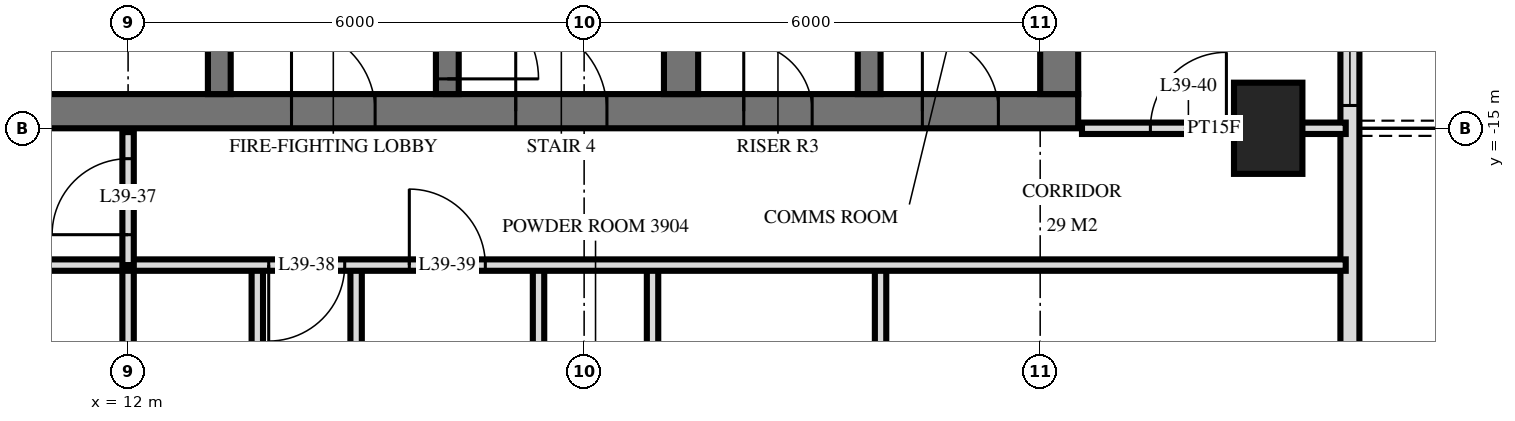
"""IFC4 building model, lengths in metres.
Left out: names, types, materials, properties, quantities, classifications, styles, units other than length and angle.
Written with IfcOpenShell. Run it as: python <this file> out.ifc"""

import sys

from ifc_helpers import new_model, si_unit, direction, frame, frame_2d, origin, origin_2d, place, context, subcontext, project, spatial, rectangle, extrude, element, fill, save


model = new_model("IFC4")
c1 = context("Model", 3, precision=1e-05, world=origin(), true_north=direction((0.0, 1.0)))
c2 = subcontext(c1, "Body", "Model", "MODEL_VIEW")
j1 = project(units=[si_unit("LENGTHUNIT", "METRE"), si_unit("PLANEANGLEUNIT", "RADIAN")], contexts=[c1])
p1 = place(None, origin())
s1 = spatial("IfcSite", under=j1, at=p1, CompositionType="ELEMENT")
p2 = place(p1, origin())
s2 = spatial("IfcBuilding", under=s1, at=p2, CompositionType="ELEMENT")
p3 = place(p2, frame((0.0, 0.0, 152.4)))
s3 = spatial("IfcBuildingStorey", under=s2, at=p3, CompositionType="ELEMENT", Elevation=152.4)
p4 = place(p3, frame((27.0, -15.0, 0.0), z_axis=(0.0, 0.0, 1.0), x_axis=(0.0, 1.0, 0.0)))
e1 = element("IfcColumn", 1, at=p4, inside=s3, PredefinedType="COLUMN", context=c2, shape_type="SweptSolid", body=[
    extrude(rectangle(XDim=1.2, YDim=0.9, at=origin_2d()), origin(), (0.0, 0.0, 1.0), 3.6),
])
p5 = place(p3, frame((10.0, -14.775, 0.0), z_axis=(0.0, 0.0, 1.0), x_axis=(1.0, 0.0, 0.0)))
e2 = element("IfcWall", 2, at=p5, inside=s3, PredefinedType="SHEAR", context=c2, shape_type="SweptSolid", body=[
    extrude(rectangle(XDim=14.5, YDim=0.45, at=frame_2d((7.25, 0.0))), origin(), (0.0, 0.0, 1.0), 3.6),
])
p6 = place(p5, frame((7.1, 0.0, 0.0)))
e3 = element("IfcOpeningElement", 3, at=p6, cuts=e2, PredefinedType="OPENING", context=c2, shape_type="SweptSolid", body=[
    extrude(rectangle(XDim=1.2, YDim=2.1, at=frame_2d((0.6, 1.05))), frame((0.0, 0.235, 0.0), z_axis=(0.0, -1.0, 0.0), x_axis=(1.0, 0.0, 0.0)), (0.0, 0.0, 1.0), 0.47),
])
p7 = place(p5, frame((4.15, 0.0, 0.0)))
e4 = element("IfcOpeningElement", 4, at=p7, cuts=e2, PredefinedType="OPENING", context=c2, shape_type="SweptSolid", body=[
    extrude(rectangle(XDim=1.1, YDim=2.1, at=frame_2d((0.55, 1.05))), frame((0.0, 0.235, 0.0), z_axis=(0.0, -1.0, 0.0), x_axis=(1.0, 0.0, 0.0)), (0.0, 0.0, 1.0), 0.47),
])
p8 = place(p5, frame((10.1, 0.0, 0.0)))
e5 = element("IfcOpeningElement", 5, at=p8, cuts=e2, PredefinedType="OPENING", context=c2, shape_type="SweptSolid", body=[
    extrude(rectangle(XDim=0.9, YDim=2.1, at=frame_2d((0.45, 1.05))), frame((0.0, 0.235, 0.0), z_axis=(0.0, -1.0, 0.0), x_axis=(1.0, 0.0, 0.0)), (0.0, 0.0, 1.0), 0.47),
])
p9 = place(p5, frame((12.45, 0.0, 0.0)))
e6 = element("IfcOpeningElement", 6, at=p9, cuts=e2, PredefinedType="OPENING", context=c2, shape_type="SweptSolid", body=[
    extrude(rectangle(XDim=1.0, YDim=2.1, at=frame_2d((0.5, 1.05))), frame((0.0, 0.235, 0.0), z_axis=(0.0, -1.0, 0.0), x_axis=(1.0, 0.0, 0.0)), (0.0, 0.0, 1.0), 0.47),
])
p10 = place(p3, frame((24.25, -14.55, 0.0), z_axis=(0.0, 0.0, 1.0), x_axis=(0.0, 1.0, 0.0)))
e7 = element("IfcWall", 7, at=p10, inside=s3, PredefinedType="SHEAR", context=c2, shape_type="SweptSolid", body=[
    extrude(rectangle(XDim=14.1, YDim=0.5, at=frame_2d((7.05, 0.0))), origin(), (0.0, 0.0, 1.0), 3.6),
])
p11 = place(p3, frame((13.2, -14.55, 0.0), z_axis=(0.0, 0.0, 1.0), x_axis=(0.0, 1.0, 0.0)))
e8 = element("IfcWall", 8, at=p11, inside=s3, PredefinedType="SHEAR", context=c2, shape_type="SweptSolid", body=[
    extrude(rectangle(XDim=5.4, YDim=0.3, at=frame_2d((2.7, 0.0))), origin(), (0.0, 0.0, 1.0), 3.6),
])
p12 = place(p11, frame((4.0, 0.0, 0.0)))
e9 = element("IfcOpeningElement", 9, at=p12, cuts=e8, PredefinedType="OPENING", context=c2, shape_type="SweptSolid", body=[
    extrude(rectangle(XDim=1.2, YDim=2.1, at=frame_2d((0.6, 1.05))), frame((0.0, 0.16, 0.0), z_axis=(0.0, -1.0, 0.0), x_axis=(1.0, 0.0, 0.0)), (0.0, 0.0, 1.0), 0.32),
])
p13 = place(p3, frame((16.2, -14.55, 0.0), z_axis=(0.0, 0.0, 1.0), x_axis=(0.0, 1.0, 0.0)))
e10 = element("IfcWall", 10, at=p13, inside=s3, PredefinedType="SHEAR", context=c2, shape_type="SweptSolid", body=[
    extrude(rectangle(XDim=5.4, YDim=0.3, at=frame_2d((2.7, 0.0))), origin(), (0.0, 0.0, 1.0), 3.6),
])
p14 = place(p13, frame((0.2, 0.0, 0.0)))
e11 = element("IfcOpeningElement", 11, at=p14, cuts=e10, PredefinedType="OPENING", context=c2, shape_type="SweptSolid", body=[
    extrude(rectangle(XDim=1.2, YDim=2.1, at=frame_2d((0.6, 1.05))), frame((0.0, 0.16, 0.0), z_axis=(0.0, -1.0, 0.0), x_axis=(1.0, 0.0, 0.0)), (0.0, 0.0, 1.0), 0.32),
])
p15 = place(p3, frame((19.275, -14.55, 0.0), z_axis=(0.0, 0.0, 1.0), x_axis=(0.0, 1.0, 0.0)))
e12 = element("IfcWall", 12, at=p15, inside=s3, PredefinedType="SHEAR", context=c2, shape_type="SweptSolid", body=[
    extrude(rectangle(XDim=5.4, YDim=0.45, at=frame_2d((2.7, 0.0))), origin(), (0.0, 0.0, 1.0), 3.6),
])
p16 = place(p3, frame((21.75, -14.55, 0.0), z_axis=(0.0, 0.0, 1.0), x_axis=(0.0, 1.0, 0.0)))
e13 = element("IfcWall", 13, at=p16, inside=s3, PredefinedType="SHEAR", context=c2, shape_type="SweptSolid", body=[
    extrude(rectangle(XDim=5.4, YDim=0.3, at=frame_2d((2.7, 0.0))), origin(), (0.0, 0.0, 1.0), 3.6),
])
p17 = place(p3, frame((28.075, -29.275, 0.0), z_axis=(0.0, 0.0, 1.0), x_axis=(0.0, 1.0, 0.0)))
e14 = element("IfcWall", 14, at=p17, inside=s3, PredefinedType="SOLIDWALL", context=c2, shape_type="SweptSolid", body=[
    extrude(rectangle(XDim=25.951, YDim=0.25, at=frame_2d((12.975, 0.0))), origin(), (0.0, 0.0, 1.0), 3.32),
])
p18 = place(p17, frame((0.575, 0.0, 0.0)))
e15 = element("IfcOpeningElement", 15, at=p18, cuts=e14, PredefinedType="OPENING", context=c2, shape_type="SweptSolid", body=[
    extrude(rectangle(XDim=1.8, YDim=2.4, at=frame_2d((0.9, 1.2))), frame((0.0, 0.135, 0.0), z_axis=(0.0, -1.0, 0.0), x_axis=(1.0, 0.0, 0.0)), (0.0, 0.0, 1.0), 0.27),
])
p19 = place(p17, frame((3.325, 0.0, 0.3)))
e16 = element("IfcOpeningElement", 16, at=p19, cuts=e14, PredefinedType="OPENING", context=c2, shape_type="SweptSolid", body=[
    extrude(rectangle(XDim=1.8, YDim=2.1, at=frame_2d((0.9, 1.05))), frame((0.0, 0.135, 0.0), z_axis=(0.0, -1.0, 0.0), x_axis=(1.0, 0.0, 0.0)), (0.0, 0.0, 1.0), 0.27),
])
p20 = place(p17, frame((9.475, 0.0, 0.0)))
e17 = element("IfcOpeningElement", 17, at=p20, cuts=e14, PredefinedType="OPENING", context=c2, shape_type="SweptSolid", body=[
    extrude(rectangle(XDim=1.8, YDim=2.4, at=frame_2d((0.9, 1.2))), frame((0.0, 0.135, 0.0), z_axis=(0.0, -1.0, 0.0), x_axis=(1.0, 0.0, 0.0)), (0.0, 0.0, 1.0), 0.27),
])
p21 = place(p17, frame((14.575, 0.0, 0.3)))
e18 = element("IfcOpeningElement", 18, at=p21, cuts=e14, PredefinedType="OPENING", context=c2, shape_type="SweptSolid", body=[
    extrude(rectangle(XDim=2.4, YDim=2.1, at=frame_2d((1.2, 1.05))), frame((0.0, 0.135, 0.0), z_axis=(0.0, -1.0, 0.0), x_axis=(1.0, 0.0, 0.0)), (0.0, 0.0, 1.0), 0.27),
])
p22 = place(p17, frame((17.875, 0.0, 0.0)))
e19 = element("IfcOpeningElement", 19, at=p22, cuts=e14, PredefinedType="OPENING", context=c2, shape_type="SweptSolid", body=[
    extrude(rectangle(XDim=1.8, YDim=2.4, at=frame_2d((0.9, 1.2))), frame((0.0, 0.135, 0.0), z_axis=(0.0, -1.0, 0.0), x_axis=(1.0, 0.0, 0.0)), (0.0, 0.0, 1.0), 0.27),
])
p23 = place(p3, frame((21.9, -21.0, 0.0), z_axis=(0.0, 0.0, 1.0), x_axis=(0.0, 1.0, 0.0)))
e20 = element("IfcWall", 20, at=p23, inside=s3, PredefinedType="PARTITIONING", context=c2, shape_type="SweptSolid", body=[
    extrude(rectangle(XDim=4.2, YDim=0.15, at=frame_2d((2.1, 0.0))), origin(), (0.0, 0.0, 1.0), 3.32),
])
p24 = place(p3, frame((18.9, -21.0, 0.0), z_axis=(0.0, 0.0, 1.0), x_axis=(0.0, 1.0, 0.0)))
e21 = element("IfcWall", 21, at=p24, inside=s3, PredefinedType="PLUMBINGWALL", context=c2, shape_type="SweptSolid", body=[
    extrude(rectangle(XDim=4.2, YDim=0.15, at=frame_2d((2.1, 0.0))), origin(), (0.0, 0.0, 1.0), 3.32),
])
p25 = place(p3, frame((17.4, -21.0, 0.0), z_axis=(0.0, 0.0, 1.0), x_axis=(0.0, 1.0, 0.0)))
e22 = element("IfcWall", 22, at=p25, inside=s3, PredefinedType="PARTITIONING", context=c2, shape_type="SweptSolid", body=[
    extrude(rectangle(XDim=4.2, YDim=0.15, at=frame_2d((2.1, 0.0))), origin(), (0.0, 0.0, 1.0), 3.32),
])
p26 = place(p25, frame((1.6, 0.0, 0.0)))
e23 = element("IfcOpeningElement", 23, at=p26, cuts=e22, PredefinedType="OPENING", context=c2, shape_type="SweptSolid", body=[
    extrude(rectangle(XDim=1.0, YDim=2.1, at=frame_2d((0.5, 1.05))), frame((0.0, 0.085, 0.0), z_axis=(0.0, -1.0, 0.0), x_axis=(1.0, 0.0, 0.0)), (0.0, 0.0, 1.0), 0.17),
])
p27 = place(p3, frame((15.0, -21.0, 0.0), z_axis=(0.0, 0.0, 1.0), x_axis=(0.0, 1.0, 0.0)))
e24 = element("IfcWall", 24, at=p27, inside=s3, PredefinedType="PARTITIONING", context=c2, shape_type="SweptSolid", body=[
    extrude(rectangle(XDim=4.2, YDim=0.15, at=frame_2d((2.1, 0.0))), origin(), (0.0, 0.0, 1.0), 3.32),
])
p28 = place(p3, frame((13.7, -21.8, 0.0), z_axis=(0.0, 0.0, 1.0), x_axis=(0.0, 1.0, 0.0)))
e25 = element("IfcWall", 25, at=p28, inside=s3, PredefinedType="PARTITIONING", context=c2, shape_type="SweptSolid", body=[
    extrude(rectangle(XDim=5.0, YDim=0.15, at=frame_2d((2.5, 0.0))), origin(), (0.0, 0.0, 1.0), 3.32),
])
p29 = place(p28, frame((2.1, 0.0, 0.0)))
e26 = element("IfcOpeningElement", 26, at=p29, cuts=e25, PredefinedType="OPENING", context=c2, shape_type="SweptSolid", body=[
    extrude(rectangle(XDim=0.8, YDim=2.1, at=frame_2d((0.4, 1.05))), frame((0.0, 0.085, 0.0), z_axis=(0.0, -1.0, 0.0), x_axis=(1.0, 0.0, 0.0)), (0.0, 0.0, 1.0), 0.17),
])
p30 = place(p3, frame((12.0, -16.8, 0.0), z_axis=(0.0, 0.0, 1.0), x_axis=(0.0, 1.0, 0.0)))
e27 = element("IfcWall", 27, at=p30, inside=s3, PredefinedType="PARTITIONING", context=c2, shape_type="SweptSolid", body=[
    extrude(rectangle(XDim=1.75, YDim=0.15, at=frame_2d((0.875, 0.0))), origin(), (0.0, 0.0, 1.0), 3.32),
])
p31 = place(p30, frame((0.4, 0.0, 0.0)))
e28 = element("IfcOpeningElement", 28, at=p31, cuts=e27, PredefinedType="OPENING", context=c2, shape_type="SweptSolid", body=[
    extrude(rectangle(XDim=1.0, YDim=2.1, at=frame_2d((0.5, 1.05))), frame((0.0, 0.085, 0.0), z_axis=(0.0, -1.0, 0.0), x_axis=(1.0, 0.0, 0.0)), (0.0, 0.0, 1.0), 0.17),
])
p32 = place(p3, frame((12.0, -33.62, 0.0), z_axis=(0.0, 0.0, 1.0), x_axis=(0.0, 1.0, 0.0)))
e29 = element("IfcWall", 29, at=p32, inside=s3, PredefinedType="PARTITIONING", context=c2, shape_type="SweptSolid", body=[
    extrude(rectangle(XDim=16.82, YDim=0.15, at=frame_2d((8.41, 0.0))), origin(), (0.0, 0.0, 1.0), 3.32),
])
p33 = place(p3, frame((-28.02, -16.8, 0.0), z_axis=(0.0, 0.0, 1.0), x_axis=(1.0, 0.0, 0.0)))
e30 = element("IfcWall", 30, at=p33, inside=s3, PredefinedType="PARTITIONING", context=c2, shape_type="SweptSolid", body=[
    extrude(rectangle(XDim=56.04, YDim=0.15, at=frame_2d((28.02, 0.0))), origin(), (0.0, 0.0, 1.0), 3.32),
])
p34 = place(p33, frame((13.17, 0.0, 0.0)))
e31 = element("IfcOpeningElement", 31, at=p34, cuts=e30, PredefinedType="OPENING", context=c2, shape_type="SweptSolid", body=[
    extrude(rectangle(XDim=1.0, YDim=2.1, at=frame_2d((0.5, 1.05))), frame((0.0, 0.085, 0.0), z_axis=(0.0, -1.0, 0.0), x_axis=(1.0, 0.0, 0.0)), (0.0, 0.0, 1.0), 0.17),
])
p35 = place(p33, frame((11.32, 0.0, 0.0)))
e32 = element("IfcOpeningElement", 32, at=p35, cuts=e30, PredefinedType="OPENING", context=c2, shape_type="SweptSolid", body=[
    extrude(rectangle(XDim=1.0, YDim=2.1, at=frame_2d((0.5, 1.05))), frame((0.0, 0.085, 0.0), z_axis=(0.0, -1.0, 0.0), x_axis=(1.0, 0.0, 0.0)), (0.0, 0.0, 1.0), 0.17),
])
p36 = place(p33, frame((41.87, 0.0, 0.0)))
e33 = element("IfcOpeningElement", 33, at=p36, cuts=e30, PredefinedType="OPENING", context=c2, shape_type="SweptSolid", body=[
    extrude(rectangle(XDim=1.0, YDim=2.1, at=frame_2d((0.5, 1.05))), frame((0.0, 0.085, 0.0), z_axis=(0.0, -1.0, 0.0), x_axis=(1.0, 0.0, 0.0)), (0.0, 0.0, 1.0), 0.17),
])
p37 = place(p33, frame((43.72, 0.0, 0.0)))
e34 = element("IfcOpeningElement", 34, at=p37, cuts=e30, PredefinedType="OPENING", context=c2, shape_type="SweptSolid", body=[
    extrude(rectangle(XDim=1.0, YDim=2.1, at=frame_2d((0.5, 1.05))), frame((0.0, 0.085, 0.0), z_axis=(0.0, -1.0, 0.0), x_axis=(1.0, 0.0, 0.0)), (0.0, 0.0, 1.0), 0.17),
])
p38 = place(p33, frame((19.52, 0.0, 0.0)))
e35 = element("IfcOpeningElement", 35, at=p38, cuts=e30, PredefinedType="OPENING", context=c2, shape_type="SweptSolid", body=[
    extrude(rectangle(XDim=1.0, YDim=2.1, at=frame_2d((0.5, 1.05))), frame((0.0, 0.085, 0.0), z_axis=(0.0, -1.0, 0.0), x_axis=(1.0, 0.0, 0.0)), (0.0, 0.0, 1.0), 0.17),
])
p39 = place(p33, frame((27.52, 0.0, 0.0)))
e36 = element("IfcOpeningElement", 36, at=p39, cuts=e30, PredefinedType="OPENING", context=c2, shape_type="SweptSolid", body=[
    extrude(rectangle(XDim=1.0, YDim=2.1, at=frame_2d((0.5, 1.05))), frame((0.0, 0.085, 0.0), z_axis=(0.0, -1.0, 0.0), x_axis=(1.0, 0.0, 0.0)), (0.0, 0.0, 1.0), 0.17),
])
p40 = place(p33, frame((35.52, 0.0, 0.0)))
e37 = element("IfcOpeningElement", 37, at=p40, cuts=e30, PredefinedType="OPENING", context=c2, shape_type="SweptSolid", body=[
    extrude(rectangle(XDim=1.0, YDim=2.1, at=frame_2d((0.5, 1.05))), frame((0.0, 0.085, 0.0), z_axis=(0.0, -1.0, 0.0), x_axis=(1.0, 0.0, 0.0)), (0.0, 0.0, 1.0), 0.17),
])
p41 = place(p3, frame((24.55, -15.0, 0.0), z_axis=(0.0, 0.0, 1.0), x_axis=(1.0, 0.0, 0.0)))
e38 = element("IfcWall", 38, at=p41, inside=s3, PredefinedType="PARTITIONING", context=c2, shape_type="SweptSolid", body=[
    extrude(rectangle(XDim=3.47, YDim=0.15, at=frame_2d((1.735, 0.0))), origin(), (0.0, 0.0, 1.0), 3.32),
])
p42 = place(p41, frame((0.9, 0.0, 0.0)))
e39 = element("IfcOpeningElement", 39, at=p42, cuts=e38, PredefinedType="OPENING", context=c2, shape_type="SweptSolid", body=[
    extrude(rectangle(XDim=1.0, YDim=2.1, at=frame_2d((0.5, 1.05))), frame((0.0, 0.085, 0.0), z_axis=(0.0, -1.0, 0.0), x_axis=(1.0, 0.0, 0.0)), (0.0, 0.0, 1.0), 0.17),
])
p43 = place(p21, origin())
e40 = element("IfcWindow", 40, at=p43, inside=s3, PartitioningType="SINGLE_PANEL", PredefinedType="WINDOW", context=c2, shape_type="SweptSolid", body=[
    extrude(rectangle(XDim=2.4, YDim=2.1, at=frame_2d((1.2, 1.05))), frame((0.0, 0.03, 0.0), z_axis=(0.0, -1.0, 0.0), x_axis=(1.0, 0.0, 0.0)), (0.0, 0.0, 1.0), 0.06),
])
fill(e18, e40)
p44 = place(p6, origin())
e41 = element("IfcDoor", 41, at=p44, inside=s3, OperationType="SINGLE_SWING_RIGHT", PredefinedType="DOOR", context=c2, shape_type="SweptSolid", body=[
    extrude(rectangle(XDim=1.2, YDim=2.1, at=frame_2d((0.6, 1.05))), frame((0.0, 0.025, 0.0), z_axis=(0.0, -1.0, 0.0), x_axis=(1.0, 0.0, 0.0)), (0.0, 0.0, 1.0), 0.05),
])
fill(e3, e41)
p45 = place(p7, origin())
e42 = element("IfcDoor", 42, at=p45, inside=s3, OperationType="SINGLE_SWING_RIGHT", PredefinedType="DOOR", context=c2, shape_type="SweptSolid", body=[
    extrude(rectangle(XDim=1.1, YDim=2.1, at=frame_2d((0.55, 1.05))), frame((0.0, 0.025, 0.0), z_axis=(0.0, -1.0, 0.0), x_axis=(1.0, 0.0, 0.0)), (0.0, 0.0, 1.0), 0.05),
])
fill(e4, e42)
p46 = place(p8, origin())
e43 = element("IfcDoor", 43, at=p46, inside=s3, OperationType="SINGLE_SWING_RIGHT", PredefinedType="DOOR", context=c2, shape_type="SweptSolid", body=[
    extrude(rectangle(XDim=0.9, YDim=2.1, at=frame_2d((0.45, 1.05))), frame((0.0, 0.025, 0.0), z_axis=(0.0, -1.0, 0.0), x_axis=(1.0, 0.0, 0.0)), (0.0, 0.0, 1.0), 0.05),
])
fill(e5, e43)
p47 = place(p9, origin())
e44 = element("IfcDoor", 44, at=p47, inside=s3, OperationType="SINGLE_SWING_RIGHT", PredefinedType="DOOR", context=c2, shape_type="SweptSolid", body=[
    extrude(rectangle(XDim=1.0, YDim=2.1, at=frame_2d((0.5, 1.05))), frame((0.0, 0.025, 0.0), z_axis=(0.0, -1.0, 0.0), x_axis=(1.0, 0.0, 0.0)), (0.0, 0.0, 1.0), 0.05),
])
fill(e6, e44)
p48 = place(p14, frame((0.6, 0.0, 0.0), z_axis=(0.0, 0.0, 1.0), x_axis=(-1.0, 0.0, 0.0)))
e45 = element("IfcDoor", 45, at=p48, inside=s3, OperationType="SINGLE_SWING_LEFT", PredefinedType="DOOR", context=c2, shape_type="SweptSolid", body=[
    extrude(rectangle(XDim=1.2, YDim=2.1, at=frame_2d((0.0, 1.05))), frame((0.0, -0.025, 0.0), z_axis=(0.0, 1.0, 0.0), x_axis=(-1.0, 0.0, 0.0)), (0.0, 0.0, 1.0), 0.05),
])
fill(e11, e45)
p49 = place(p31, origin())
e46 = element("IfcDoor", 46, at=p49, inside=s3, OperationType="SINGLE_SWING_RIGHT", PredefinedType="DOOR", context=c2, shape_type="SweptSolid", body=[
    extrude(rectangle(XDim=1.0, YDim=2.1, at=frame_2d((0.5, 1.05))), frame((0.0, 0.025, 0.0), z_axis=(0.0, -1.0, 0.0), x_axis=(1.0, 0.0, 0.0)), (0.0, 0.0, 1.0), 0.05),
])
fill(e28, e46)
p50 = place(p36, frame((0.5, 0.0, 0.0), z_axis=(0.0, 0.0, 1.0), x_axis=(-1.0, 0.0, 0.0)))
e47 = element("IfcDoor", 47, at=p50, inside=s3, OperationType="SINGLE_SWING_LEFT", PredefinedType="DOOR", context=c2, shape_type="SweptSolid", body=[
    extrude(rectangle(XDim=1.0, YDim=2.1, at=frame_2d((0.0, 1.05))), frame((0.0, -0.025, 0.0), z_axis=(0.0, 1.0, 0.0), x_axis=(-1.0, 0.0, 0.0)), (0.0, 0.0, 1.0), 0.05),
])
fill(e33, e47)
p51 = place(p37, origin())
e48 = element("IfcDoor", 48, at=p51, inside=s3, OperationType="SINGLE_SWING_RIGHT", PredefinedType="DOOR", context=c2, shape_type="SweptSolid", body=[
    extrude(rectangle(XDim=1.0, YDim=2.1, at=frame_2d((0.5, 1.05))), frame((0.0, 0.025, 0.0), z_axis=(0.0, -1.0, 0.0), x_axis=(1.0, 0.0, 0.0)), (0.0, 0.0, 1.0), 0.05),
])
fill(e34, e48)
p52 = place(p42, origin())
e49 = element("IfcDoor", 49, at=p52, inside=s3, OperationType="SINGLE_SWING_LEFT", PredefinedType="DOOR", context=c2, shape_type="SweptSolid", body=[
    extrude(rectangle(XDim=1.0, YDim=2.1, at=frame_2d((0.5, 1.05))), frame((0.0, 0.025, 0.0), z_axis=(0.0, -1.0, 0.0), x_axis=(1.0, 0.0, 0.0)), (0.0, 0.0, 1.0), 0.05),
])
fill(e39, e49)
save(model, sys.argv[1])
